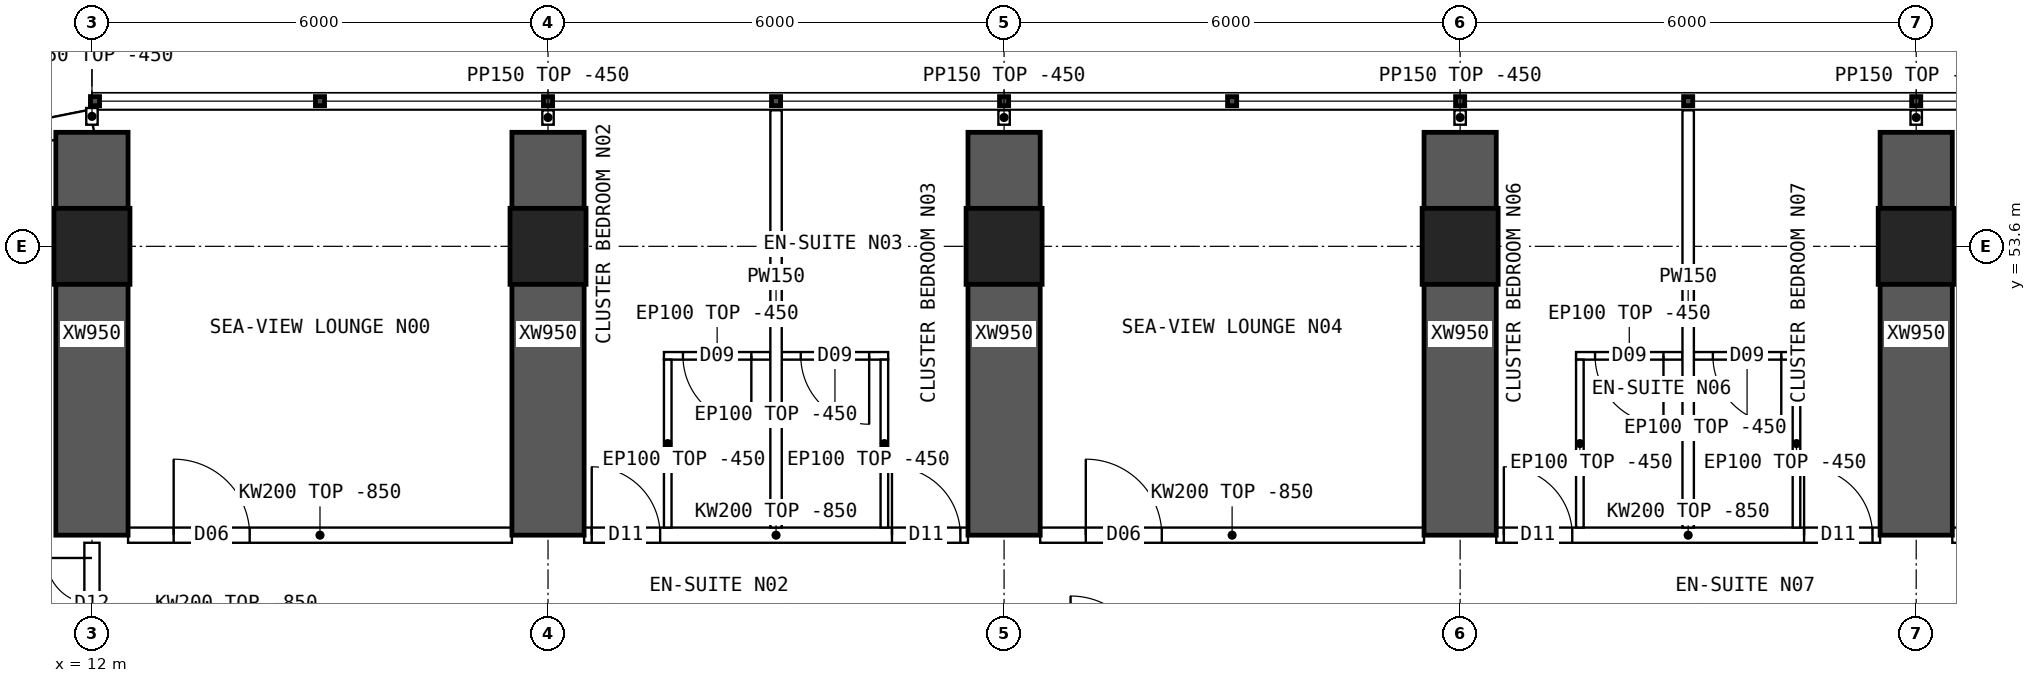
"""IFC4 building model, lengths in metres.
Left out: names, types, materials, properties, quantities, classifications, styles, units other than length and angle.
Written with IfcOpenShell. Run it as: python <this file> out.ifc"""

import sys

from ifc_helpers import new_model, si_unit, direction, frame, frame_2d, origin, origin_2d, place, context, subcontext, project, spatial, polyline, rectangle, hollow_rectangle, outline, extrude, element, fill, save


model = new_model("IFC4")
c1 = context("Model", 3, precision=1e-05, world=origin(), true_north=direction((0.0, 1.0)))
c2 = subcontext(c1, "Body", "Model", "MODEL_VIEW")
j1 = project(units=[si_unit("LENGTHUNIT", "METRE"), si_unit("PLANEANGLEUNIT", "RADIAN")], contexts=[c1])
p1 = place(None, origin())
s1 = spatial("IfcSite", under=j1, at=p1, CompositionType="ELEMENT")
p2 = place(p1, origin())
s2 = spatial("IfcBuilding", under=s1, at=p2, CompositionType="ELEMENT")
p3 = place(p2, frame((0.0, 0.0, 95.65)))
s3 = spatial("IfcBuildingStorey", under=s2, at=p3, CompositionType="ELEMENT", Elevation=95.65)
for number, where, z_axis, x_axis in (
    (1, (12.0, 53.6, 0.0), (0.0, 0.0, 1.0), (1.0, 0.0, 0.0)),
    (2, (18.0, 53.6, 0.0), (0.0, 0.0, 1.0), (1.0, 0.0, 0.0)),
    (3, (24.0, 53.6, 0.0), (0.0, 0.0, 1.0), (1.0, 0.0, 0.0)),
    (4, (30.0, 53.6, 0.0), (0.0, 0.0, 1.0), (1.0, 0.0, 0.0)),
    (5, (36.0, 53.6, 0.0), (0.0, 0.0, 1.0), (1.0, 0.0, 0.0)),
):
    element("IfcColumn", number, at=place(p3, frame(where, z_axis=z_axis, x_axis=x_axis)), inside=s3, PredefinedType="COLUMN", context=c2, shape_type="SweptSolid", body=[
        extrude(hollow_rectangle(XDim=1.0, YDim=1.0, WallThickness=0.1, at=origin_2d()), origin(), (0.0, 0.0, 1.0), 3.75),
    ])
for number, where, z_axis, x_axis in (
    (6, (12.0, 49.8, 0.0), (0.0, 0.0, 1.0), (0.0, 1.0, 0.0)),
    (7, (18.0, 49.8, 0.0), (0.0, 0.0, 1.0), (0.0, 1.0, 0.0)),
    (8, (24.0, 49.8, 0.0), (0.0, 0.0, 1.0), (0.0, 1.0, 0.0)),
    (9, (30.0, 49.8, 0.0), (0.0, 0.0, 1.0), (0.0, 1.0, 0.0)),
    (10, (36.0, 49.8, 0.0), (0.0, 0.0, 1.0), (0.0, 1.0, 0.0)),
):
    element("IfcWall", number, at=place(p3, frame(where, z_axis=z_axis, x_axis=x_axis)), inside=s3, PredefinedType="SHEAR", context=c2, shape_type="SweptSolid", body=[
        extrude(rectangle(XDim=5.3, YDim=0.95, at=frame_2d((2.65, 0.0))), origin(), (0.0, 0.0, 1.0), 3.75),
    ])
p4 = place(p3, frame((12.0, 55.25, 0.0), z_axis=(0.0, 0.0, 1.0), x_axis=(-0.980787251524, -0.195080412259, 0.0)))
e11 = element("IfcWall", 11, at=p4, inside=s3, PredefinedType="SOLIDWALL", context=c2, shape_type="SweptSolid", body=[
    extrude(outline(polyline([(-0.03, -0.15), (3.249, -0.15), (3.189, 0.15), (0.03, 0.15), (-0.03, -0.15)])), origin(), (0.0, 0.0, 1.0), 3.3),
])
p5 = place(p4, frame((0.909, 0.0, 0.9)))
e12 = element("IfcOpeningElement", 12, at=p5, cuts=e11, PredefinedType="OPENING", context=c2, shape_type="SweptSolid", body=[
    extrude(rectangle(XDim=1.4, YDim=1.8, at=frame_2d((0.7, 0.9))), frame((0.0, 0.16, 0.0), z_axis=(0.0, -1.0, 0.0), x_axis=(1.0, 0.0, 0.0)), (0.0, 0.0, 1.0), 0.32),
])
p6 = place(p3, frame((12.475, 49.8, 0.0), z_axis=(0.0, 0.0, 1.0), x_axis=(1.0, 0.0, 0.0)))
e13 = element("IfcWall", 13, at=p6, inside=s3, PredefinedType="SOLIDWALL", context=c2, shape_type="SweptSolid", body=[
    extrude(outline(polyline([(0.0, 0.0), (5.05, 0.0), (5.05, 2.9), (0.0, 2.9), (0.0, 0.0)])), frame((0.0, 0.1, 0.0), z_axis=(0.0, -1.0, 0.0), x_axis=(1.0, 0.0, 0.0)), (0.0, 0.0, 1.0), 0.2),
])
p7 = place(p6, frame((0.6, 0.0, 0.0)))
e14 = element("IfcOpeningElement", 14, at=p7, cuts=e13, PredefinedType="OPENING", context=c2, shape_type="SweptSolid", body=[
    extrude(rectangle(XDim=1.0, YDim=2.1, at=frame_2d((0.5, 1.05))), frame((0.0, 0.11, 0.0), z_axis=(0.0, -1.0, 0.0), x_axis=(1.0, 0.0, 0.0)), (0.0, 0.0, 1.0), 0.22),
])
p8 = place(p3, frame((18.475, 49.8, 0.0), z_axis=(0.0, 0.0, 1.0), x_axis=(1.0, 0.0, 0.0)))
e15 = element("IfcWall", 15, at=p8, inside=s3, PredefinedType="SOLIDWALL", context=c2, shape_type="SweptSolid", body=[
    extrude(outline(polyline([(0.0, 0.0), (5.05, 0.0), (5.05, 2.9), (0.0, 2.9), (0.0, 0.0)])), frame((0.0, 0.1, 0.0), z_axis=(0.0, -1.0, 0.0), x_axis=(1.0, 0.0, 0.0)), (0.0, 0.0, 1.0), 0.2),
])
p9 = place(p8, frame((0.1, 0.0, 0.0)))
e16 = element("IfcOpeningElement", 16, at=p9, cuts=e15, PredefinedType="OPENING", context=c2, shape_type="SweptSolid", body=[
    extrude(rectangle(XDim=0.9, YDim=2.1, at=frame_2d((0.45, 1.05))), frame((0.0, 0.11, 0.0), z_axis=(0.0, -1.0, 0.0), x_axis=(1.0, 0.0, 0.0)), (0.0, 0.0, 1.0), 0.22),
])
p10 = place(p8, frame((4.05, 0.0, 0.0)))
e17 = element("IfcOpeningElement", 17, at=p10, cuts=e15, PredefinedType="OPENING", context=c2, shape_type="SweptSolid", body=[
    extrude(rectangle(XDim=0.9, YDim=2.1, at=frame_2d((0.45, 1.05))), frame((0.0, 0.11, 0.0), z_axis=(0.0, -1.0, 0.0), x_axis=(1.0, 0.0, 0.0)), (0.0, 0.0, 1.0), 0.22),
])
p11 = place(p3, frame((24.475, 49.8, 0.0), z_axis=(0.0, 0.0, 1.0), x_axis=(1.0, 0.0, 0.0)))
e18 = element("IfcWall", 18, at=p11, inside=s3, PredefinedType="SOLIDWALL", context=c2, shape_type="SweptSolid", body=[
    extrude(outline(polyline([(0.0, 0.0), (5.05, 0.0), (5.05, 2.9), (0.0, 2.9), (0.0, 0.0)])), frame((0.0, 0.1, 0.0), z_axis=(0.0, -1.0, 0.0), x_axis=(1.0, 0.0, 0.0)), (0.0, 0.0, 1.0), 0.2),
])
p12 = place(p11, frame((0.6, 0.0, 0.0)))
e19 = element("IfcOpeningElement", 19, at=p12, cuts=e18, PredefinedType="OPENING", context=c2, shape_type="SweptSolid", body=[
    extrude(rectangle(XDim=1.0, YDim=2.1, at=frame_2d((0.5, 1.05))), frame((0.0, 0.11, 0.0), z_axis=(0.0, -1.0, 0.0), x_axis=(1.0, 0.0, 0.0)), (0.0, 0.0, 1.0), 0.22),
])
p13 = place(p3, frame((30.475, 49.8, 0.0), z_axis=(0.0, 0.0, 1.0), x_axis=(1.0, 0.0, 0.0)))
e20 = element("IfcWall", 20, at=p13, inside=s3, PredefinedType="SOLIDWALL", context=c2, shape_type="SweptSolid", body=[
    extrude(outline(polyline([(0.0, 0.0), (5.05, 0.0), (5.05, 2.9), (0.0, 2.9), (0.0, 0.0)])), frame((0.0, 0.1, 0.0), z_axis=(0.0, -1.0, 0.0), x_axis=(1.0, 0.0, 0.0)), (0.0, 0.0, 1.0), 0.2),
])
p14 = place(p13, frame((0.1, 0.0, 0.0)))
e21 = element("IfcOpeningElement", 21, at=p14, cuts=e20, PredefinedType="OPENING", context=c2, shape_type="SweptSolid", body=[
    extrude(rectangle(XDim=0.9, YDim=2.1, at=frame_2d((0.45, 1.05))), frame((0.0, 0.11, 0.0), z_axis=(0.0, -1.0, 0.0), x_axis=(1.0, 0.0, 0.0)), (0.0, 0.0, 1.0), 0.22),
])
p15 = place(p13, frame((4.05, 0.0, 0.0)))
e22 = element("IfcOpeningElement", 22, at=p15, cuts=e20, PredefinedType="OPENING", context=c2, shape_type="SweptSolid", body=[
    extrude(rectangle(XDim=0.9, YDim=2.1, at=frame_2d((0.45, 1.05))), frame((0.0, 0.11, 0.0), z_axis=(0.0, -1.0, 0.0), x_axis=(1.0, 0.0, 0.0)), (0.0, 0.0, 1.0), 0.22),
])
p16 = place(p3, frame((36.475, 49.8, 0.0), z_axis=(0.0, 0.0, 1.0), x_axis=(1.0, 0.0, 0.0)))
e23 = element("IfcWall", 23, at=p16, inside=s3, PredefinedType="SOLIDWALL", context=c2, shape_type="SweptSolid", body=[
    extrude(outline(polyline([(0.0, 0.0), (5.05, 0.0), (5.05, 2.9), (0.0, 2.9), (0.0, 0.0)])), frame((0.0, 0.1, 0.0), z_axis=(0.0, -1.0, 0.0), x_axis=(1.0, 0.0, 0.0)), (0.0, 0.0, 1.0), 0.2),
])
p17 = place(p16, frame((0.3, 0.0, 0.0)))
e24 = element("IfcOpeningElement", 24, at=p17, cuts=e23, PredefinedType="OPENING", context=c2, shape_type="SweptSolid", body=[
    extrude(rectangle(XDim=1.0, YDim=2.1, at=frame_2d((0.5, 1.05))), frame((0.0, 0.11, 0.0), z_axis=(0.0, -1.0, 0.0), x_axis=(1.0, 0.0, 0.0)), (0.0, 0.0, 1.0), 0.22),
])
p18 = place(p3, frame((21.0, 55.39, 0.0), z_axis=(0.0, 0.0, 1.0), x_axis=(0.0, -1.0, 0.0)))
e25 = element("IfcWall", 25, at=p18, inside=s3, PredefinedType="PARTITIONING", context=c2, shape_type="SweptSolid", body=[
    extrude(outline(polyline([(0.0, 0.0), (5.49, 0.0), (5.49, 2.9), (5.442, 2.9), (5.44, 3.3), (1.992, 3.3), (1.99, 2.9), (1.592, 2.9), (1.59, 3.3), (0.0, 3.3), (0.0, 0.0)])), frame((0.0, 0.075, 0.0), z_axis=(0.0, -1.0, 0.0), x_axis=(1.0, 0.0, 0.0)), (0.0, 0.0, 1.0), 0.15),
])
p19 = place(p3, frame((19.525, 52.159, 0.0), z_axis=(0.0, 0.0, 1.0), x_axis=(1.0, 0.0, 0.0)))
e26 = element("IfcWall", 26, at=p19, inside=s3, PredefinedType="PARTITIONING", context=c2, shape_type="SweptSolid", body=[
    extrude(rectangle(XDim=1.4, YDim=0.1, at=frame_2d((0.7, 0.0))), origin(), (0.0, 0.0, 1.0), 3.3),
])
p20 = place(p19, frame((0.25, 0.0, 0.0)))
e27 = element("IfcOpeningElement", 27, at=p20, cuts=e26, PredefinedType="OPENING", context=c2, shape_type="SweptSolid", body=[
    extrude(rectangle(XDim=0.9, YDim=2.1, at=frame_2d((0.45, 1.05))), frame((0.0, 0.06, 0.0), z_axis=(0.0, -1.0, 0.0), x_axis=(1.0, 0.0, 0.0)), (0.0, 0.0, 1.0), 0.12),
])
p21 = place(p3, frame((19.575, 52.109, 0.0), z_axis=(0.0, 0.0, 1.0), x_axis=(0.0, -1.0, 0.0)))
e28 = element("IfcWall", 28, at=p21, inside=s3, PredefinedType="PARTITIONING", context=c2, shape_type="SweptSolid", body=[
    extrude(outline(polyline([(0.0, 0.0), (2.209, 0.0), (2.209, 2.9), (2.161, 2.9), (2.159, 3.3), (0.0, 3.3), (0.0, 0.0)])), frame((0.0, 0.05, 0.0), z_axis=(0.0, -1.0, 0.0), x_axis=(1.0, 0.0, 0.0)), (0.0, 0.0, 1.0), 0.1),
])
p22 = place(p3, frame((21.075, 52.159, 0.0), z_axis=(0.0, 0.0, 1.0), x_axis=(1.0, 0.0, 0.0)))
e29 = element("IfcWall", 29, at=p22, inside=s3, PredefinedType="PARTITIONING", context=c2, shape_type="SweptSolid", body=[
    extrude(rectangle(XDim=1.4, YDim=0.1, at=frame_2d((0.7, 0.0))), origin(), (0.0, 0.0, 1.0), 3.3),
])
p23 = place(p22, frame((0.25, 0.0, 0.0)))
e30 = element("IfcOpeningElement", 30, at=p23, cuts=e29, PredefinedType="OPENING", context=c2, shape_type="SweptSolid", body=[
    extrude(rectangle(XDim=0.9, YDim=2.1, at=frame_2d((0.45, 1.05))), frame((0.0, 0.06, 0.0), z_axis=(0.0, -1.0, 0.0), x_axis=(1.0, 0.0, 0.0)), (0.0, 0.0, 1.0), 0.12),
])
p24 = place(p3, frame((22.425, 52.109, 0.0), z_axis=(0.0, 0.0, 1.0), x_axis=(0.0, -1.0, 0.0)))
e31 = element("IfcWall", 31, at=p24, inside=s3, PredefinedType="PARTITIONING", context=c2, shape_type="SweptSolid", body=[
    extrude(outline(polyline([(0.0, 0.0), (2.209, 0.0), (2.209, 2.9), (2.161, 2.9), (2.159, 3.3), (0.0, 3.3), (0.0, 0.0)])), frame((0.0, 0.05, 0.0), z_axis=(0.0, -1.0, 0.0), x_axis=(1.0, 0.0, 0.0)), (0.0, 0.0, 1.0), 0.1),
])
p25 = place(p3, frame((33.0, 55.39, 0.0), z_axis=(0.0, 0.0, 1.0), x_axis=(0.0, -1.0, 0.0)))
e32 = element("IfcWall", 32, at=p25, inside=s3, PredefinedType="PARTITIONING", context=c2, shape_type="SweptSolid", body=[
    extrude(outline(polyline([(0.0, 0.0), (5.49, 0.0), (5.49, 2.9), (5.442, 2.9), (5.44, 3.3), (1.992, 3.3), (1.99, 2.9), (1.592, 2.9), (1.59, 3.3), (0.0, 3.3), (0.0, 0.0)])), frame((0.0, 0.075, 0.0), z_axis=(0.0, -1.0, 0.0), x_axis=(1.0, 0.0, 0.0)), (0.0, 0.0, 1.0), 0.15),
])
p26 = place(p3, frame((31.525, 52.159, 0.0), z_axis=(0.0, 0.0, 1.0), x_axis=(1.0, 0.0, 0.0)))
e33 = element("IfcWall", 33, at=p26, inside=s3, PredefinedType="PARTITIONING", context=c2, shape_type="SweptSolid", body=[
    extrude(rectangle(XDim=1.4, YDim=0.1, at=frame_2d((0.7, 0.0))), origin(), (0.0, 0.0, 1.0), 3.3),
])
p27 = place(p26, frame((0.25, 0.0, 0.0)))
e34 = element("IfcOpeningElement", 34, at=p27, cuts=e33, PredefinedType="OPENING", context=c2, shape_type="SweptSolid", body=[
    extrude(rectangle(XDim=0.9, YDim=2.1, at=frame_2d((0.45, 1.05))), frame((0.0, 0.06, 0.0), z_axis=(0.0, -1.0, 0.0), x_axis=(1.0, 0.0, 0.0)), (0.0, 0.0, 1.0), 0.12),
])
p28 = place(p3, frame((31.575, 52.109, 0.0), z_axis=(0.0, 0.0, 1.0), x_axis=(0.0, -1.0, 0.0)))
e35 = element("IfcWall", 35, at=p28, inside=s3, PredefinedType="PARTITIONING", context=c2, shape_type="SweptSolid", body=[
    extrude(outline(polyline([(0.0, 0.0), (2.209, 0.0), (2.209, 2.9), (2.161, 2.9), (2.159, 3.3), (0.0, 3.3), (0.0, 0.0)])), frame((0.0, 0.05, 0.0), z_axis=(0.0, -1.0, 0.0), x_axis=(1.0, 0.0, 0.0)), (0.0, 0.0, 1.0), 0.1),
])
p29 = place(p3, frame((33.075, 52.159, 0.0), z_axis=(0.0, 0.0, 1.0), x_axis=(1.0, 0.0, 0.0)))
e36 = element("IfcWall", 36, at=p29, inside=s3, PredefinedType="PARTITIONING", context=c2, shape_type="SweptSolid", body=[
    extrude(rectangle(XDim=1.4, YDim=0.1, at=frame_2d((0.7, 0.0))), origin(), (0.0, 0.0, 1.0), 3.3),
])
p30 = place(p29, frame((0.25, 0.0, 0.0)))
e37 = element("IfcOpeningElement", 37, at=p30, cuts=e36, PredefinedType="OPENING", context=c2, shape_type="SweptSolid", body=[
    extrude(rectangle(XDim=0.9, YDim=2.1, at=frame_2d((0.45, 1.05))), frame((0.0, 0.06, 0.0), z_axis=(0.0, -1.0, 0.0), x_axis=(1.0, 0.0, 0.0)), (0.0, 0.0, 1.0), 0.12),
])
p31 = place(p3, frame((34.425, 52.109, 0.0), z_axis=(0.0, 0.0, 1.0), x_axis=(0.0, -1.0, 0.0)))
e38 = element("IfcWall", 38, at=p31, inside=s3, PredefinedType="PARTITIONING", context=c2, shape_type="SweptSolid", body=[
    extrude(outline(polyline([(0.0, 0.0), (2.209, 0.0), (2.209, 2.9), (2.161, 2.9), (2.159, 3.3), (0.0, 3.3), (0.0, 0.0)])), frame((0.0, 0.05, 0.0), z_axis=(0.0, -1.0, 0.0), x_axis=(1.0, 0.0, 0.0)), (0.0, 0.0, 1.0), 0.1),
])
p32 = place(p3, frame((12.0, 48.1, 0.0), z_axis=(0.0, 0.0, 1.0), x_axis=(0.0, 1.0, 0.0)))
e39 = element("IfcWall", 39, at=p32, inside=s3, PredefinedType="SOLIDWALL", context=c2, shape_type="SweptSolid", body=[
    extrude(outline(polyline([(0.0, 0.0), (1.6, 0.0), (1.6, 2.9), (0.0, 2.9), (0.0, 0.0)])), frame((0.0, 0.1, 0.0), z_axis=(0.0, -1.0, 0.0), x_axis=(1.0, 0.0, 0.0)), (0.0, 0.0, 1.0), 0.2),
])
p33 = place(p32, frame((0.2, 0.0, 0.0)))
e40 = element("IfcOpeningElement", 40, at=p33, cuts=e39, PredefinedType="OPENING", context=c2, shape_type="SweptSolid", body=[
    extrude(rectangle(XDim=1.2, YDim=2.1, at=frame_2d((0.6, 1.05))), frame((0.0, 0.11, 0.0), z_axis=(0.0, -1.0, 0.0), x_axis=(1.0, 0.0, 0.0)), (0.0, 0.0, 1.0), 0.22),
])
p34 = place(p3, frame((12.0, 55.2, 0.0), z_axis=(0.0, 0.0, 1.0), x_axis=(0.0, 1.0, 0.0)))
e41 = element("IfcWall", 41, at=p34, inside=s3, PredefinedType="PARTITIONING", context=c2, shape_type="SweptSolid", body=[
    extrude(rectangle(XDim=0.22, YDim=0.15, at=frame_2d((0.11, 0.0))), origin(), (0.0, 0.0, 1.0), 3.3),
])
for number, where, z_axis, x_axis in (
    (42, (18.0, 55.2, 0.0), (0.0, 0.0, 1.0), (0.0, 1.0, 0.0)),
    (43, (24.0, 55.2, 0.0), (0.0, 0.0, 1.0), (0.0, 1.0, 0.0)),
    (44, (30.0, 55.2, 0.0), (0.0, 0.0, 1.0), (0.0, 1.0, 0.0)),
    (45, (36.0, 55.2, 0.0), (0.0, 0.0, 1.0), (0.0, 1.0, 0.0)),
):
    element("IfcWall", number, at=place(p3, frame(where, z_axis=z_axis, x_axis=x_axis)), inside=s3, PredefinedType="PARTITIONING", context=c2, shape_type="SweptSolid", body=[
        extrude(rectangle(XDim=0.19, YDim=0.15, at=frame_2d((0.095, 0.0))), origin(), (0.0, 0.0, 1.0), 3.3),
    ])
p35 = place(p7, origin())
e46 = element("IfcDoor", 46, at=p35, inside=s3, OperationType="SINGLE_SWING_LEFT", PredefinedType="DOOR", context=c2, shape_type="SweptSolid", body=[
    extrude(rectangle(XDim=1.0, YDim=2.1, at=frame_2d((0.5, 1.05))), frame((0.0, 0.025, 0.0), z_axis=(0.0, -1.0, 0.0), x_axis=(1.0, 0.0, 0.0)), (0.0, 0.0, 1.0), 0.05),
])
fill(e14, e46)
p36 = place(p20, origin())
e47 = element("IfcDoor", 47, at=p36, inside=s3, OperationType="SINGLE_SWING_RIGHT", PredefinedType="DOOR", context=c2, shape_type="SweptSolid", body=[
    extrude(rectangle(XDim=0.9, YDim=2.1, at=frame_2d((0.45, 1.05))), frame((0.0, 0.025, 0.0), z_axis=(0.0, -1.0, 0.0), x_axis=(1.0, 0.0, 0.0)), (0.0, 0.0, 1.0), 0.05),
])
fill(e27, e47)
p37 = place(p9, origin())
e48 = element("IfcDoor", 48, at=p37, inside=s3, OperationType="SINGLE_SWING_LEFT", PredefinedType="DOOR", context=c2, shape_type="SweptSolid", body=[
    extrude(rectangle(XDim=0.9, YDim=2.1, at=frame_2d((0.45, 1.05))), frame((0.0, 0.025, 0.0), z_axis=(0.0, -1.0, 0.0), x_axis=(1.0, 0.0, 0.0)), (0.0, 0.0, 1.0), 0.05),
])
fill(e16, e48)
p38 = place(p23, origin())
e49 = element("IfcDoor", 49, at=p38, inside=s3, OperationType="SINGLE_SWING_RIGHT", PredefinedType="DOOR", context=c2, shape_type="SweptSolid", body=[
    extrude(rectangle(XDim=0.9, YDim=2.1, at=frame_2d((0.45, 1.05))), frame((0.0, 0.025, 0.0), z_axis=(0.0, -1.0, 0.0), x_axis=(1.0, 0.0, 0.0)), (0.0, 0.0, 1.0), 0.05),
])
fill(e30, e49)
p39 = place(p10, origin())
e50 = element("IfcDoor", 50, at=p39, inside=s3, OperationType="SINGLE_SWING_LEFT", PredefinedType="DOOR", context=c2, shape_type="SweptSolid", body=[
    extrude(rectangle(XDim=0.9, YDim=2.1, at=frame_2d((0.45, 1.05))), frame((0.0, 0.025, 0.0), z_axis=(0.0, -1.0, 0.0), x_axis=(1.0, 0.0, 0.0)), (0.0, 0.0, 1.0), 0.05),
])
fill(e17, e50)
p40 = place(p12, origin())
e51 = element("IfcDoor", 51, at=p40, inside=s3, OperationType="SINGLE_SWING_LEFT", PredefinedType="DOOR", context=c2, shape_type="SweptSolid", body=[
    extrude(rectangle(XDim=1.0, YDim=2.1, at=frame_2d((0.5, 1.05))), frame((0.0, 0.025, 0.0), z_axis=(0.0, -1.0, 0.0), x_axis=(1.0, 0.0, 0.0)), (0.0, 0.0, 1.0), 0.05),
])
fill(e19, e51)
p41 = place(p27, origin())
e52 = element("IfcDoor", 52, at=p41, inside=s3, OperationType="SINGLE_SWING_RIGHT", PredefinedType="DOOR", context=c2, shape_type="SweptSolid", body=[
    extrude(rectangle(XDim=0.9, YDim=2.1, at=frame_2d((0.45, 1.05))), frame((0.0, 0.025, 0.0), z_axis=(0.0, -1.0, 0.0), x_axis=(1.0, 0.0, 0.0)), (0.0, 0.0, 1.0), 0.05),
])
fill(e34, e52)
p42 = place(p14, origin())
e53 = element("IfcDoor", 53, at=p42, inside=s3, OperationType="SINGLE_SWING_LEFT", PredefinedType="DOOR", context=c2, shape_type="SweptSolid", body=[
    extrude(rectangle(XDim=0.9, YDim=2.1, at=frame_2d((0.45, 1.05))), frame((0.0, 0.025, 0.0), z_axis=(0.0, -1.0, 0.0), x_axis=(1.0, 0.0, 0.0)), (0.0, 0.0, 1.0), 0.05),
])
fill(e21, e53)
p43 = place(p30, origin())
e54 = element("IfcDoor", 54, at=p43, inside=s3, OperationType="SINGLE_SWING_RIGHT", PredefinedType="DOOR", context=c2, shape_type="SweptSolid", body=[
    extrude(rectangle(XDim=0.9, YDim=2.1, at=frame_2d((0.45, 1.05))), frame((0.0, 0.025, 0.0), z_axis=(0.0, -1.0, 0.0), x_axis=(1.0, 0.0, 0.0)), (0.0, 0.0, 1.0), 0.05),
])
fill(e37, e54)
p44 = place(p15, origin())
e55 = element("IfcDoor", 55, at=p44, inside=s3, OperationType="SINGLE_SWING_LEFT", PredefinedType="DOOR", context=c2, shape_type="SweptSolid", body=[
    extrude(rectangle(XDim=0.9, YDim=2.1, at=frame_2d((0.45, 1.05))), frame((0.0, 0.025, 0.0), z_axis=(0.0, -1.0, 0.0), x_axis=(1.0, 0.0, 0.0)), (0.0, 0.0, 1.0), 0.05),
])
fill(e22, e55)
p45 = place(p33, origin())
e56 = element("IfcDoor", 56, at=p45, inside=s3, OperationType="DOUBLE_DOOR_SINGLE_SWING", PredefinedType="DOOR", context=c2, shape_type="SweptSolid", body=[
    extrude(rectangle(XDim=1.2, YDim=2.1, at=frame_2d((0.6, 1.05))), frame((0.0, 0.025, 0.0), z_axis=(0.0, -1.0, 0.0), x_axis=(1.0, 0.0, 0.0)), (0.0, 0.0, 1.0), 0.05),
])
fill(e40, e56)
save(model, sys.argv[1])
